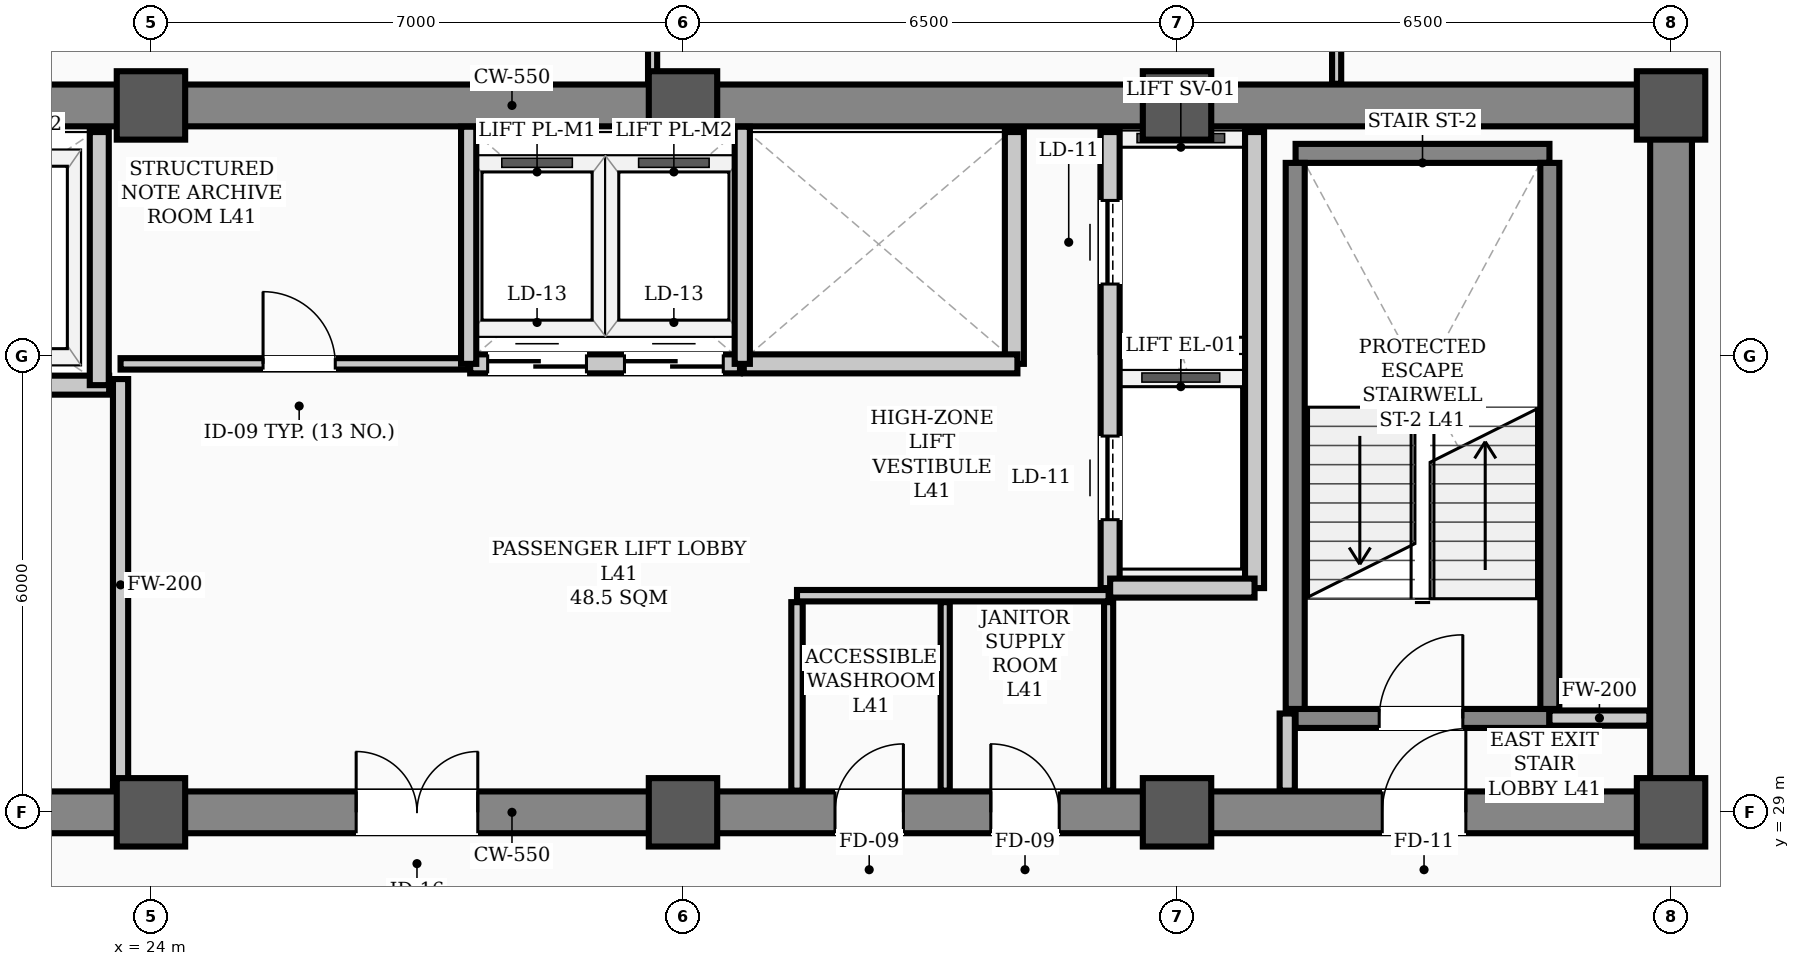
"""IFC4 building model, lengths in metres.
Left out: names, types, materials, properties, quantities, classifications, styles, units other than length and angle.
Written with IfcOpenShell. Run it as: python <this file> out.ifc"""

import sys

from ifc_helpers import new_model, si_unit, direction, frame, frame_2d, origin, origin_2d, place, context, subcontext, project, spatial, rectangle, hollow_rectangle, extrude, element, fill, save


model = new_model("IFC4")
c1 = context("Model", 3, precision=1e-05, world=origin(), true_north=direction((0.0, 1.0)))
c2 = subcontext(c1, "Body", "Model", "MODEL_VIEW")
j1 = project(units=[si_unit("LENGTHUNIT", "METRE"), si_unit("PLANEANGLEUNIT", "RADIAN")], contexts=[c1])
p1 = place(None, origin())
s1 = spatial("IfcSite", under=j1, at=p1, CompositionType="ELEMENT")
p2 = place(p1, origin())
s2 = spatial("IfcBuilding", under=s1, at=p2, CompositionType="ELEMENT")
p3 = place(p2, frame((0.0, 0.0, 165.6)))
s3 = spatial("IfcBuildingStorey", under=s2, at=p3, CompositionType="ELEMENT", Elevation=165.6)
for number, where, z_axis, x_axis in (
    (1, (24.0, 29.0, 0.0), (0.0, 0.0, 1.0), (1.0, 0.0, 0.0)),
    (2, (24.0, 38.3, 0.0), (0.0, 0.0, 1.0), (1.0, 0.0, 0.0)),
    (3, (31.0, 29.0, 0.0), (0.0, 0.0, 1.0), (1.0, 0.0, 0.0)),
    (4, (31.0, 38.3, 0.0), (0.0, 0.0, 1.0), (1.0, 0.0, 0.0)),
    (5, (37.5, 29.0, 0.0), (0.0, 0.0, 1.0), (1.0, 0.0, 0.0)),
    (6, (37.5, 38.3, 0.0), (0.0, 0.0, 1.0), (1.0, 0.0, 0.0)),
    (7, (44.0, 29.0, 0.0), (0.0, 0.0, 1.0), (1.0, 0.0, 0.0)),
    (8, (44.0, 38.3, 0.0), (0.0, 0.0, 1.0), (1.0, 0.0, 0.0)),
):
    element("IfcColumn", number, at=place(p3, frame(where, z_axis=z_axis, x_axis=x_axis)), inside=s3, PredefinedType="COLUMN", context=c2, shape_type="SweptSolid", body=[
        extrude(hollow_rectangle(XDim=0.9, YDim=0.9, WallThickness=0.035, InnerFilletRadius=0.017, OuterFilletRadius=0.052, at=origin_2d()), origin(), (0.0, 0.0, 1.0), 3.9),
    ])
p4 = place(p3, frame((13.5, 29.0, 0.0), z_axis=(0.0, 0.0, 1.0), x_axis=(1.0, 0.0, 0.0)))
e9 = element("IfcWall", 9, at=p4, inside=s3, PredefinedType="SHEAR", context=c2, shape_type="SweptSolid", body=[
    extrude(rectangle(XDim=30.5, YDim=0.55, at=frame_2d((15.25, 0.0))), origin(), (0.0, 0.0, 1.0), 3.66),
])
p5 = place(p4, frame((1.75, 0.0, 0.0)))
e10 = element("IfcOpeningElement", 10, at=p5, cuts=e9, PredefinedType="OPENING", context=c2, shape_type="SweptSolid", body=[
    extrude(rectangle(XDim=1.1, YDim=2.08, at=frame_2d((0.55, 1.04))), frame((0.0, 0.285, 0.0), z_axis=(0.0, -1.0, 0.0), x_axis=(1.0, 0.0, 0.0)), (0.0, 0.0, 1.0), 0.57),
])
p6 = place(p4, frame((26.7, 0.0, 0.0)))
e11 = element("IfcOpeningElement", 11, at=p6, cuts=e9, PredefinedType="OPENING", context=c2, shape_type="SweptSolid", body=[
    extrude(rectangle(XDim=1.1, YDim=2.08, at=frame_2d((0.55, 1.04))), frame((0.0, 0.285, 0.0), z_axis=(0.0, -1.0, 0.0), x_axis=(1.0, 0.0, 0.0)), (0.0, 0.0, 1.0), 0.57),
])
p7 = place(p4, frame((6.8, 0.0, 0.0)))
e12 = element("IfcOpeningElement", 12, at=p7, cuts=e9, PredefinedType="OPENING", context=c2, shape_type="SweptSolid", body=[
    extrude(rectangle(XDim=1.1, YDim=2.08, at=frame_2d((0.55, 1.04))), frame((0.0, 0.285, 0.0), z_axis=(0.0, -1.0, 0.0), x_axis=(1.0, 0.0, 0.0)), (0.0, 0.0, 1.0), 0.57),
])
p8 = place(p4, frame((13.2, 0.0, 0.0)))
e13 = element("IfcOpeningElement", 13, at=p8, cuts=e9, PredefinedType="OPENING", context=c2, shape_type="SweptSolid", body=[
    extrude(rectangle(XDim=1.6, YDim=2.08, at=frame_2d((0.8, 1.04))), frame((0.0, 0.285, 0.0), z_axis=(0.0, -1.0, 0.0), x_axis=(1.0, 0.0, 0.0)), (0.0, 0.0, 1.0), 0.57),
])
p9 = place(p4, frame((19.5, 0.0, 0.0)))
e14 = element("IfcOpeningElement", 14, at=p9, cuts=e9, PredefinedType="OPENING", context=c2, shape_type="SweptSolid", body=[
    extrude(rectangle(XDim=0.9, YDim=2.08, at=frame_2d((0.45, 1.04))), frame((0.0, 0.285, 0.0), z_axis=(0.0, -1.0, 0.0), x_axis=(1.0, 0.0, 0.0)), (0.0, 0.0, 1.0), 0.57),
])
p10 = place(p4, frame((21.55, 0.0, 0.0)))
e15 = element("IfcOpeningElement", 15, at=p10, cuts=e9, PredefinedType="OPENING", context=c2, shape_type="SweptSolid", body=[
    extrude(rectangle(XDim=0.9, YDim=2.08, at=frame_2d((0.45, 1.04))), frame((0.0, 0.285, 0.0), z_axis=(0.0, -1.0, 0.0), x_axis=(1.0, 0.0, 0.0)), (0.0, 0.0, 1.0), 0.57),
])
p11 = place(p3, frame((13.5, 38.3, 0.0), z_axis=(0.0, 0.0, 1.0), x_axis=(1.0, 0.0, 0.0)))
e16 = element("IfcWall", 16, at=p11, inside=s3, PredefinedType="SHEAR", context=c2, shape_type="SweptSolid", body=[
    extrude(rectangle(XDim=30.5, YDim=0.55, at=frame_2d((15.25, 0.0))), origin(), (0.0, 0.0, 1.0), 3.66),
])
p12 = place(p3, frame((44.0, 29.35, 0.0), z_axis=(0.0, 0.0, 1.0), x_axis=(0.0, 1.0, 0.0)))
e17 = element("IfcWall", 17, at=p12, inside=s3, PredefinedType="SHEAR", context=c2, shape_type="SweptSolid", body=[
    extrude(rectangle(XDim=8.6, YDim=0.55, at=frame_2d((4.3, 0.0))), origin(), (0.0, 0.0, 1.0), 3.66),
])
p13 = place(p3, frame((39.06, 30.235, 0.0), z_axis=(0.0, 0.0, 1.0), x_axis=(1.0, 0.0, 0.0)))
e18 = element("IfcWall", 18, at=p13, inside=s3, PredefinedType="STANDARD", context=c2, shape_type="SweptSolid", body=[
    extrude(rectangle(XDim=3.34, YDim=0.25, at=frame_2d((1.67, 0.0))), origin(), (0.0, 0.0, 1.0), 3.66),
])
p14 = place(p13, frame((1.1, 0.0, 0.0)))
e19 = element("IfcOpeningElement", 19, at=p14, cuts=e18, PredefinedType="OPENING", context=c2, shape_type="SweptSolid", body=[
    extrude(rectangle(XDim=1.1, YDim=2.08, at=frame_2d((0.55, 1.04))), frame((0.0, 0.135, 0.0), z_axis=(0.0, -1.0, 0.0), x_axis=(1.0, 0.0, 0.0)), (0.0, 0.0, 1.0), 0.27),
])
p15 = place(p3, frame((39.06, 37.669, 0.0), z_axis=(0.0, 0.0, 1.0), x_axis=(1.0, 0.0, 0.0)))
e20 = element("IfcWall", 20, at=p15, inside=s3, PredefinedType="STANDARD", context=c2, shape_type="SweptSolid", body=[
    extrude(rectangle(XDim=3.34, YDim=0.25, at=frame_2d((1.67, 0.0))), origin(), (0.0, 0.0, 1.0), 3.66),
])
for number, where, z_axis, x_axis in (
    (21, (39.055, 30.36, 0.0), (0.0, 0.0, 1.0), (0.0, 1.0, 0.0)),
    (22, (42.405, 30.36, 0.0), (0.0, 0.0, 1.0), (0.0, 1.0, 0.0)),
):
    element("IfcWall", number, at=place(p3, frame(where, z_axis=z_axis, x_axis=x_axis)), inside=s3, PredefinedType="STANDARD", context=c2, shape_type="SweptSolid", body=[
        extrude(rectangle(XDim=7.184, YDim=0.25, at=frame_2d((3.592, 0.0))), origin(), (0.0, 0.0, 1.0), 3.66),
    ])
p16 = place(p3, frame((18.1, 34.62, 0.0), z_axis=(0.0, 0.0, 1.0), x_axis=(1.0, 0.0, 0.0)))
e23 = element("IfcWall", 23, at=p16, inside=s3, PredefinedType="STANDARD", context=c2, shape_type="SweptSolid", body=[
    extrude(rectangle(XDim=5.35, YDim=0.25, at=frame_2d((2.675, 0.0))), origin(), (0.0, 0.0, 1.0), 3.66),
])
p17 = place(p16, frame((0.85, 0.0, 0.0)))
e24 = element("IfcOpeningElement", 24, at=p17, cuts=e23, PredefinedType="OPENING", context=c2, shape_type="SweptSolid", body=[
    extrude(rectangle(XDim=1.1, YDim=2.08, at=frame_2d((0.55, 1.04))), frame((0.0, 0.135, 0.0), z_axis=(0.0, -1.0, 0.0), x_axis=(1.0, 0.0, 0.0)), (0.0, 0.0, 1.0), 0.27),
])
p18 = place(p16, frame((3.45, 0.0, 0.0)))
e25 = element("IfcOpeningElement", 25, at=p18, cuts=e23, PredefinedType="OPENING", context=c2, shape_type="SweptSolid", body=[
    extrude(rectangle(XDim=1.1, YDim=2.08, at=frame_2d((0.55, 1.04))), frame((0.0, 0.135, 0.0), z_axis=(0.0, -1.0, 0.0), x_axis=(1.0, 0.0, 0.0)), (0.0, 0.0, 1.0), 0.27),
])
p19 = place(p3, frame((36.62, 31.95, 0.0), z_axis=(0.0, 0.0, 1.0), x_axis=(0.0, 1.0, 0.0)))
e26 = element("IfcWall", 26, at=p19, inside=s3, PredefinedType="STANDARD", context=c2, shape_type="SweptSolid", body=[
    extrude(rectangle(XDim=6.0, YDim=0.25, at=frame_2d((3.0, 0.0))), origin(), (0.0, 0.0, 1.0), 2.24),
])
p20 = place(p19, frame((0.9, 0.0, 0.0)))
e27 = element("IfcOpeningElement", 27, at=p20, cuts=e26, PredefinedType="OPENING", context=c2, shape_type="SweptSolid", body=[
    extrude(rectangle(XDim=1.1, YDim=2.08, at=frame_2d((0.55, 1.04))), frame((0.0, 0.135, 0.0), z_axis=(0.0, -1.0, 0.0), x_axis=(1.0, 0.0, 0.0)), (0.0, 0.0, 1.0), 0.27),
])
p21 = place(p19, frame((4.0, 0.0, 0.0)))
e28 = element("IfcOpeningElement", 28, at=p21, cuts=e26, PredefinedType="OPENING", context=c2, shape_type="SweptSolid", body=[
    extrude(rectangle(XDim=1.1, YDim=2.08, at=frame_2d((0.55, 1.04))), frame((0.0, 0.135, 0.0), z_axis=(0.0, -1.0, 0.0), x_axis=(1.0, 0.0, 0.0)), (0.0, 0.0, 1.0), 0.27),
])
p22 = place(p3, frame((38.52, 31.95, 0.0), z_axis=(0.0, 0.0, 1.0), x_axis=(0.0, 1.0, 0.0)))
e29 = element("IfcWall", 29, at=p22, inside=s3, PredefinedType="STANDARD", context=c2, shape_type="SweptSolid", body=[
    extrude(rectangle(XDim=6.0, YDim=0.25, at=frame_2d((3.0, 0.0))), origin(), (0.0, 0.0, 1.0), 2.24),
])
p23 = place(p3, frame((36.62, 31.95, 0.0), z_axis=(0.0, 0.0, 1.0), x_axis=(1.0, 0.0, 0.0)))
e30 = element("IfcWall", 30, at=p23, inside=s3, PredefinedType="STANDARD", context=c2, shape_type="SweptSolid", body=[
    extrude(rectangle(XDim=1.9, YDim=0.25, at=frame_2d((0.95, 0.0))), origin(), (0.0, 0.0, 1.0), 3.48),
])
p24 = place(p3, frame((23.32, 34.62, 0.0), z_axis=(0.0, 0.0, 1.0), x_axis=(0.0, 1.0, 0.0)))
e31 = element("IfcWall", 31, at=p24, inside=s3, PredefinedType="STANDARD", context=c2, shape_type="SweptSolid", body=[
    extrude(rectangle(XDim=3.33, YDim=0.25, at=frame_2d((1.665, 0.0))), origin(), (0.0, 0.0, 1.0), 2.24),
])
p25 = place(p3, frame((35.36, 34.9, 0.0), z_axis=(0.0, 0.0, 1.0), x_axis=(0.0, 1.0, 0.0)))
e32 = element("IfcWall", 32, at=p25, inside=s3, PredefinedType="STANDARD", context=c2, shape_type="SweptSolid", body=[
    extrude(rectangle(XDim=3.05, YDim=0.25, at=frame_2d((1.525, 0.0))), origin(), (0.0, 0.0, 1.0), 2.24),
])
p26 = place(p3, frame((28.2, 34.9, 0.0), z_axis=(0.0, 0.0, 1.0), x_axis=(1.0, 0.0, 0.0)))
e33 = element("IfcWall", 33, at=p26, inside=s3, PredefinedType="STANDARD", context=c2, shape_type="SweptSolid", body=[
    extrude(rectangle(XDim=3.55, YDim=0.25, at=frame_2d((1.775, 0.0))), origin(), (0.0, 0.0, 1.0), 3.66),
])
p27 = place(p26, frame((0.23, 0.0, 0.0)))
e34 = element("IfcOpeningElement", 34, at=p27, cuts=e33, PredefinedType="OPENING", context=c2, shape_type="SweptSolid", body=[
    extrude(rectangle(XDim=1.3, YDim=2.08, at=frame_2d((0.65, 1.04))), frame((0.0, 0.135, 0.0), z_axis=(0.0, -1.0, 0.0), x_axis=(1.0, 0.0, 0.0)), (0.0, 0.0, 1.0), 0.27),
])
p28 = place(p26, frame((2.03, 0.0, 0.0)))
e35 = element("IfcOpeningElement", 35, at=p28, cuts=e33, PredefinedType="OPENING", context=c2, shape_type="SweptSolid", body=[
    extrude(rectangle(XDim=1.3, YDim=2.08, at=frame_2d((0.65, 1.04))), frame((0.0, 0.135, 0.0), z_axis=(0.0, -1.0, 0.0), x_axis=(1.0, 0.0, 0.0)), (0.0, 0.0, 1.0), 0.27),
])
p29 = place(p3, frame((31.8, 34.9, 0.0), z_axis=(0.0, 0.0, 1.0), x_axis=(1.0, 0.0, 0.0)))
e36 = element("IfcWall", 36, at=p29, inside=s3, PredefinedType="STANDARD", context=c2, shape_type="SweptSolid", body=[
    extrude(rectangle(XDim=3.6, YDim=0.25, at=frame_2d((1.8, 0.0))), origin(), (0.0, 0.0, 1.0), 3.66),
])
p30 = place(p3, frame((42.4, 30.24, 0.0), z_axis=(0.0, 0.0, 1.0), x_axis=(1.0, 0.0, 0.0)))
e37 = element("IfcWall", 37, at=p30, inside=s3, PredefinedType="STANDARD", context=c2, shape_type="SweptSolid", body=[
    extrude(rectangle(XDim=1.315, YDim=0.2, at=frame_2d((0.658, 0.0))), origin(), (0.0, 0.0, 1.0), 2.24),
])
p31 = place(p3, frame((23.6, 34.9, 0.0), z_axis=(0.0, 0.0, 1.0), x_axis=(1.0, 0.0, 0.0)))
e38 = element("IfcWall", 38, at=p31, inside=s3, PredefinedType="PARTITIONING", context=c2, shape_type="SweptSolid", body=[
    extrude(rectangle(XDim=4.58, YDim=0.15, at=frame_2d((2.29, 0.0))), origin(), (0.0, 0.0, 1.0), 3.66),
])
p32 = place(p31, frame((1.875, 0.0, 0.0)))
e39 = element("IfcOpeningElement", 39, at=p32, cuts=e38, PredefinedType="OPENING", context=c2, shape_type="SweptSolid", body=[
    extrude(rectangle(XDim=0.95, YDim=2.08, at=frame_2d((0.475, 1.04))), frame((0.0, 0.085, 0.0), z_axis=(0.0, -1.0, 0.0), x_axis=(1.0, 0.0, 0.0)), (0.0, 0.0, 1.0), 0.17),
])
p33 = place(p3, frame((32.5, 31.85, 0.0), z_axis=(0.0, 0.0, 1.0), x_axis=(1.0, 0.0, 0.0)))
e40 = element("IfcWall", 40, at=p33, inside=s3, PredefinedType="PARTITIONING", context=c2, shape_type="SweptSolid", body=[
    extrude(rectangle(XDim=4.1, YDim=0.15, at=frame_2d((2.05, 0.0))), origin(), (0.0, 0.0, 1.0), 3.66),
])
p34 = place(p3, frame((38.95, 29.285, 0.0), z_axis=(0.0, 0.0, 1.0), x_axis=(0.0, 1.0, 0.0)))
e41 = element("IfcWall", 41, at=p34, inside=s3, PredefinedType="STANDARD", context=c2, shape_type="SweptSolid", body=[
    extrude(rectangle(XDim=1.015, YDim=0.2, at=frame_2d((0.508, 0.0))), origin(), (0.0, 0.0, 1.0), 2.24),
])
p35 = place(p3, frame((23.6, 29.285, 0.0), z_axis=(0.0, 0.0, 1.0), x_axis=(0.0, 1.0, 0.0)))
e42 = element("IfcWall", 42, at=p35, inside=s3, PredefinedType="STANDARD", context=c2, shape_type="SweptSolid", body=[
    extrude(rectangle(XDim=5.415, YDim=0.2, at=frame_2d((2.708, 0.0))), origin(), (0.0, 0.0, 1.0), 2.24),
])
p36 = place(p3, frame((32.5, 29.285, 0.0), z_axis=(0.0, 0.0, 1.0), x_axis=(0.0, 1.0, 0.0)))
e43 = element("IfcWall", 43, at=p36, inside=s3, PredefinedType="PARTITIONING", context=c2, shape_type="SweptSolid", body=[
    extrude(rectangle(XDim=2.48, YDim=0.15, at=frame_2d((1.24, 0.0))), origin(), (0.0, 0.0, 1.0), 2.24),
])
for number, where, z_axis, x_axis in (
    (44, (36.6, 29.285, 0.0), (0.0, 0.0, 1.0), (0.0, 1.0, 0.0)),
    (45, (34.45, 29.285, 0.0), (0.0, 0.0, 1.0), (0.0, 1.0, 0.0)),
):
    element("IfcWall", number, at=place(p3, frame(where, z_axis=z_axis, x_axis=x_axis)), inside=s3, PredefinedType="PARTITIONING", context=c2, shape_type="SweptSolid", body=[
        extrude(rectangle(XDim=2.48, YDim=0.12, at=frame_2d((1.24, 0.0))), origin(), (0.0, 0.0, 1.0), 2.24),
    ])
p37 = place(p3, frame((30.6, 38.585, 0.0), z_axis=(0.0, 0.0, 1.0), x_axis=(0.0, 1.0, 0.0)))
e46 = element("IfcWall", 46, at=p37, inside=s3, PredefinedType="PARTITIONING", context=c2, shape_type="SweptSolid", body=[
    extrude(rectangle(XDim=7.105, YDim=0.12, at=frame_2d((3.552, 0.0))), origin(), (0.0, 0.0, 1.0), 2.24),
])
p38 = place(p37, frame((3.81, 0.0, 0.0)))
e47 = element("IfcOpeningElement", 47, at=p38, cuts=e46, PredefinedType="OPENING", context=c2, shape_type="SweptSolid", body=[
    extrude(rectangle(XDim=0.95, YDim=2.08, at=frame_2d((0.475, 1.04))), frame((0.0, 0.07, 0.0), z_axis=(0.0, -1.0, 0.0), x_axis=(1.0, 0.0, 0.0)), (0.0, 0.0, 1.0), 0.14),
])
p39 = place(p3, frame((39.6, 38.585, 0.0), z_axis=(0.0, 0.0, 1.0), x_axis=(0.0, 1.0, 0.0)))
e48 = element("IfcWall", 48, at=p39, inside=s3, PredefinedType="PARTITIONING", context=c2, shape_type="SweptSolid", body=[
    extrude(rectangle(XDim=7.105, YDim=0.12, at=frame_2d((3.552, 0.0))), origin(), (0.0, 0.0, 1.0), 2.24),
])
p40 = place(p39, frame((3.81, 0.0, 0.0)))
e49 = element("IfcOpeningElement", 49, at=p40, cuts=e48, PredefinedType="OPENING", context=c2, shape_type="SweptSolid", body=[
    extrude(rectangle(XDim=0.95, YDim=2.08, at=frame_2d((0.475, 1.04))), frame((0.0, 0.07, 0.0), z_axis=(0.0, -1.0, 0.0), x_axis=(1.0, 0.0, 0.0)), (0.0, 0.0, 1.0), 0.14),
])
for number, where, z_axis, x_axis in (
    (50, (28.18, 34.9, 0.0), (0.0, 0.0, 1.0), (0.0, 1.0, 0.0)),
    (51, (31.78, 34.9, 0.0), (0.0, 0.0, 1.0), (0.0, 1.0, 0.0)),
):
    element("IfcWall", number, at=place(p3, frame(where, z_axis=z_axis, x_axis=x_axis)), inside=s3, PredefinedType="STANDARD", context=c2, shape_type="SweptSolid", body=[
        extrude(rectangle(XDim=3.12, YDim=0.2, at=frame_2d((1.56, 0.0))), origin(), (0.0, 0.0, 1.0), 2.24),
    ])
p41 = place(p14, origin())
e52 = element("IfcDoor", 52, at=p41, inside=s3, OperationType="SINGLE_SWING_RIGHT", PredefinedType="DOOR", context=c2, shape_type="SweptSolid", body=[
    extrude(rectangle(XDim=1.1, YDim=2.08, at=frame_2d((0.55, 1.04))), frame((0.0, 0.025, 0.0), z_axis=(0.0, -1.0, 0.0), x_axis=(1.0, 0.0, 0.0)), (0.0, 0.0, 1.0), 0.05),
])
fill(e19, e52)
p42 = place(p6, origin())
e53 = element("IfcDoor", 53, at=p42, inside=s3, OperationType="SINGLE_SWING_RIGHT", PredefinedType="DOOR", context=c2, shape_type="SweptSolid", body=[
    extrude(rectangle(XDim=1.1, YDim=2.08, at=frame_2d((0.55, 1.04))), frame((0.0, 0.025, 0.0), z_axis=(0.0, -1.0, 0.0), x_axis=(1.0, 0.0, 0.0)), (0.0, 0.0, 1.0), 0.05),
])
fill(e11, e53)
p43 = place(p8, origin())
e54 = element("IfcDoor", 54, at=p43, inside=s3, OperationType="DOUBLE_DOOR_SINGLE_SWING", PredefinedType="DOOR", context=c2, shape_type="SweptSolid", body=[
    extrude(rectangle(XDim=1.6, YDim=2.08, at=frame_2d((0.8, 1.04))), frame((0.0, 0.025, 0.0), z_axis=(0.0, -1.0, 0.0), x_axis=(1.0, 0.0, 0.0)), (0.0, 0.0, 1.0), 0.05),
])
fill(e13, e54)
p44 = place(p32, origin())
e55 = element("IfcDoor", 55, at=p44, inside=s3, OperationType="SINGLE_SWING_LEFT", PredefinedType="DOOR", context=c2, shape_type="SweptSolid", body=[
    extrude(rectangle(XDim=0.95, YDim=2.08, at=frame_2d((0.475, 1.04))), frame((0.0, 0.025, 0.0), z_axis=(0.0, -1.0, 0.0), x_axis=(1.0, 0.0, 0.0)), (0.0, 0.0, 1.0), 0.05),
])
fill(e39, e55)
p45 = place(p9, origin())
e56 = element("IfcDoor", 56, at=p45, inside=s3, OperationType="SINGLE_SWING_RIGHT", PredefinedType="DOOR", context=c2, shape_type="SweptSolid", body=[
    extrude(rectangle(XDim=0.9, YDim=2.08, at=frame_2d((0.45, 1.04))), frame((0.0, 0.025, 0.0), z_axis=(0.0, -1.0, 0.0), x_axis=(1.0, 0.0, 0.0)), (0.0, 0.0, 1.0), 0.05),
])
fill(e14, e56)
p46 = place(p10, origin())
e57 = element("IfcDoor", 57, at=p46, inside=s3, OperationType="SINGLE_SWING_LEFT", PredefinedType="DOOR", context=c2, shape_type="SweptSolid", body=[
    extrude(rectangle(XDim=0.9, YDim=2.08, at=frame_2d((0.45, 1.04))), frame((0.0, 0.025, 0.0), z_axis=(0.0, -1.0, 0.0), x_axis=(1.0, 0.0, 0.0)), (0.0, 0.0, 1.0), 0.05),
])
fill(e15, e57)
p47 = place(p20, origin())
e58 = element("IfcDoor", 58, at=p47, inside=s3, OperationType="SLIDING_TO_LEFT", PredefinedType="DOOR", context=c2, shape_type="SweptSolid", body=[
    extrude(rectangle(XDim=1.1, YDim=2.08, at=frame_2d((0.55, 1.04))), frame((0.0, 0.025, 0.0), z_axis=(0.0, -1.0, 0.0), x_axis=(1.0, 0.0, 0.0)), (0.0, 0.0, 1.0), 0.05),
])
fill(e27, e58)
p48 = place(p21, origin())
e59 = element("IfcDoor", 59, at=p48, inside=s3, OperationType="SLIDING_TO_LEFT", PredefinedType="DOOR", context=c2, shape_type="SweptSolid", body=[
    extrude(rectangle(XDim=1.1, YDim=2.08, at=frame_2d((0.55, 1.04))), frame((0.0, 0.025, 0.0), z_axis=(0.0, -1.0, 0.0), x_axis=(1.0, 0.0, 0.0)), (0.0, 0.0, 1.0), 0.05),
])
fill(e28, e59)
p49 = place(p27, origin())
e60 = element("IfcDoor", 60, at=p49, inside=s3, OperationType="DOUBLE_DOOR_SLIDING", PredefinedType="DOOR", context=c2, shape_type="SweptSolid", body=[
    extrude(rectangle(XDim=1.3, YDim=2.08, at=frame_2d((0.65, 1.04))), frame((0.0, 0.025, 0.0), z_axis=(0.0, -1.0, 0.0), x_axis=(1.0, 0.0, 0.0)), (0.0, 0.0, 1.0), 0.05),
])
fill(e34, e60)
p50 = place(p28, origin())
e61 = element("IfcDoor", 61, at=p50, inside=s3, OperationType="DOUBLE_DOOR_SLIDING", PredefinedType="DOOR", context=c2, shape_type="SweptSolid", body=[
    extrude(rectangle(XDim=1.3, YDim=2.08, at=frame_2d((0.65, 1.04))), frame((0.0, 0.025, 0.0), z_axis=(0.0, -1.0, 0.0), x_axis=(1.0, 0.0, 0.0)), (0.0, 0.0, 1.0), 0.05),
])
fill(e35, e61)
save(model, sys.argv[1])
